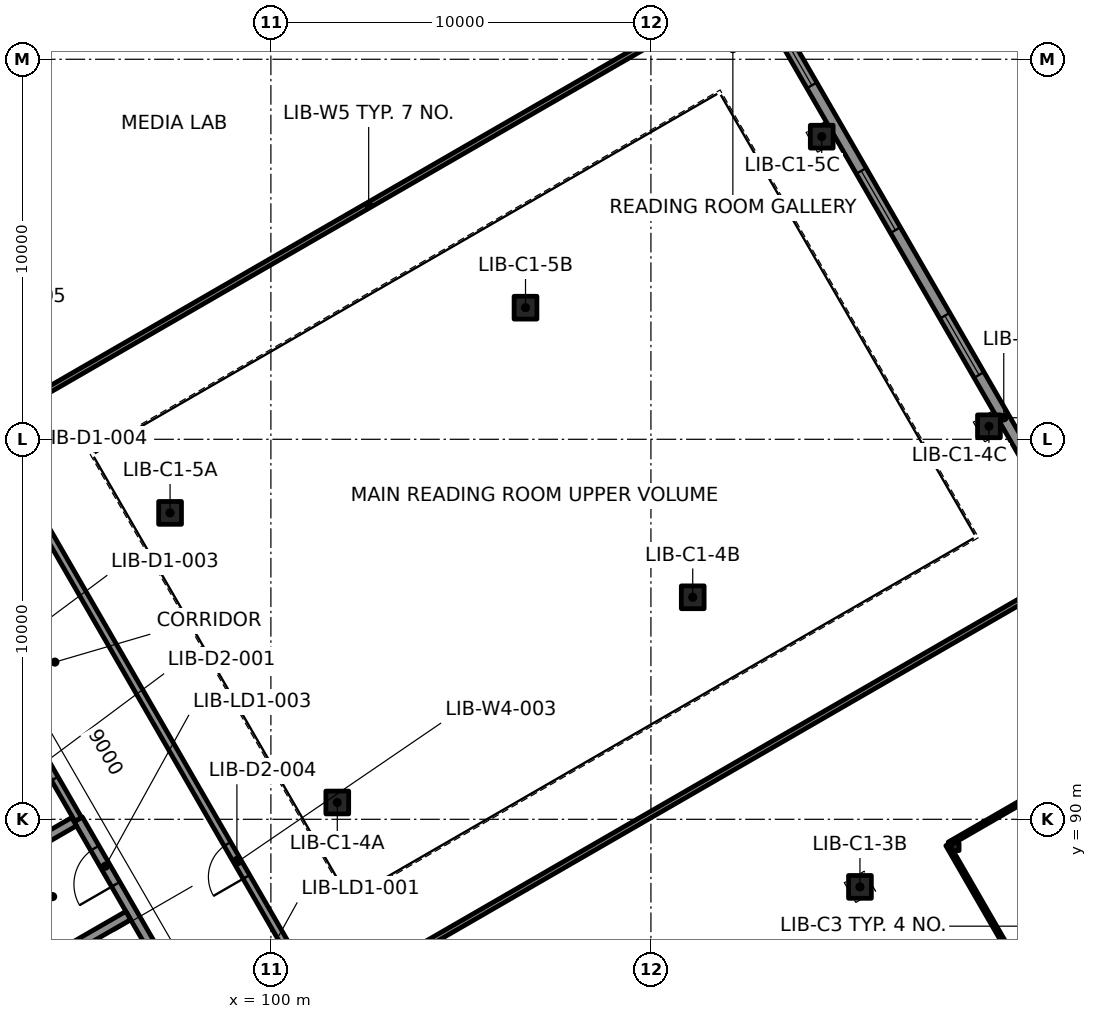
"""IFC4 building model, lengths in metres.
Left out: names, types, materials, properties, quantities, classifications, styles, units other than length and angle.
Written with IfcOpenShell. Run it as: python <this file> out.ifc"""

import sys

from ifc_helpers import new_model, si_unit, direction, frame, frame_2d, origin, origin_2d, place, context, subcontext, project, spatial, rectangle, extrude, element, fill, save


model = new_model("IFC4")
c1 = context("Model", 3, precision=1e-05, world=origin(), true_north=direction((0.0, 1.0)))
c2 = subcontext(c1, "Body", "Model", "MODEL_VIEW")
j1 = project(units=[si_unit("LENGTHUNIT", "METRE"), si_unit("PLANEANGLEUNIT", "RADIAN")], contexts=[c1])
p1 = place(None, origin())
s1 = spatial("IfcSite", under=j1, at=p1, CompositionType="ELEMENT")
p2 = place(p1, origin())
s2 = spatial("IfcBuilding", under=s1, at=p2, CompositionType="ELEMENT")
p3 = place(p2, frame((0.0, 0.0, 12.6)))
s3 = spatial("IfcBuildingStorey", under=s2, at=p3, CompositionType="ELEMENT", Elevation=12.6)
for number, where, z_axis, x_axis in (
    (1, (115.5, 88.221, -0.36), (0.0, 0.0, 1.0), (1.0, 0.0, 0.0)),
    (2, (101.747, 90.442, -0.36), (0.0, 0.0, 1.0), (1.0, 0.0, 0.0)),
    (3, (111.1, 95.842, -0.36), (0.0, 0.0, 1.0), (1.0, 0.0, 0.0)),
    (4, (118.894, 100.342, -0.36), (0.0, 0.0, 1.0), (1.0, 0.0, 0.0)),
    (5, (97.347, 98.063, -0.36), (0.0, 0.0, 1.0), (1.0, 0.0, 0.0)),
    (6, (106.7, 103.463, -0.36), (0.0, 0.0, 1.0), (1.0, 0.0, 0.0)),
    (7, (114.494, 107.963, -0.36), (0.0, 0.0, 1.0), (1.0, 0.0, 0.0)),
):
    element("IfcColumn", number, at=place(p3, frame(where, z_axis=z_axis, x_axis=x_axis)), inside=s3, PredefinedType="COLUMN", context=c2, shape_type="SweptSolid", body=[
        extrude(rectangle(XDim=0.6, YDim=0.6, at=origin_2d()), origin(), (0.0, 0.0, 1.0), 4.6),
    ])
p4 = place(p3, frame((118.008, 89.277, -2.3), z_axis=(0.0, 0.0, 1.0), x_axis=(1.0, 0.0, 0.0)))
e8 = element("IfcColumn", 8, at=p4, inside=s3, PredefinedType="COLUMN", context=c2, shape_type="SweptSolid", body=[
    extrude(rectangle(XDim=0.2, YDim=0.2, at=origin_2d()), origin(), (0.0, 0.0, 1.0), 4.4),
])
p5 = place(p3, frame((107.106, 62.36, 0.0), z_axis=(0.0, 0.0, 1.0), x_axis=(-0.49999992739, 0.866025445706, 0.0)))
e9 = element("IfcWall", 9, at=p5, inside=s3, PredefinedType="SOLIDWALL", context=c2, shape_type="SweptSolid", body=[
    extrude(rectangle(XDim=54.0, YDim=0.4, at=frame_2d((27.0, 0.0))), origin(), (0.0, 0.0, 1.0), 4.24),
])
p6 = place(p3, frame((132.784, 77.185, 0.0), z_axis=(0.0, 0.0, 1.0), x_axis=(-0.49999992739, 0.866025445706, 0.0)))
e10 = element("IfcWall", 10, at=p6, inside=s3, PredefinedType="SOLIDWALL", context=c2, shape_type="SweptSolid", body=[
    extrude(rectangle(XDim=54.0, YDim=0.3, at=frame_2d((27.0, 0.0))), origin(), (0.0, 0.0, 1.0), 4.24),
])
p7 = place(p6, frame((1.9, 0.0, 0.9)))
e11 = element("IfcOpeningElement", 11, at=p7, cuts=e10, PredefinedType="OPENING", context=c2, shape_type="SweptSolid", body=[
    extrude(rectangle(XDim=1.8, YDim=2.4, at=frame_2d((0.9, 1.2))), frame((0.0, 0.16, 0.0), z_axis=(0.0, -1.0, 0.0), x_axis=(1.0, 0.0, 0.0)), (0.0, 0.0, 1.0), 0.32),
])
p8 = place(p6, frame((6.3, 0.0, 0.9)))
e12 = element("IfcOpeningElement", 12, at=p8, cuts=e10, PredefinedType="OPENING", context=c2, shape_type="SweptSolid", body=[
    extrude(rectangle(XDim=1.8, YDim=2.4, at=frame_2d((0.9, 1.2))), frame((0.0, 0.16, 0.0), z_axis=(0.0, -1.0, 0.0), x_axis=(1.0, 0.0, 0.0)), (0.0, 0.0, 1.0), 0.32),
])
p9 = place(p6, frame((10.7, 0.0, 0.9)))
e13 = element("IfcOpeningElement", 13, at=p9, cuts=e10, PredefinedType="OPENING", context=c2, shape_type="SweptSolid", body=[
    extrude(rectangle(XDim=1.8, YDim=2.4, at=frame_2d((0.9, 1.2))), frame((0.0, 0.16, 0.0), z_axis=(0.0, -1.0, 0.0), x_axis=(1.0, 0.0, 0.0)), (0.0, 0.0, 1.0), 0.32),
])
p10 = place(p6, frame((15.1, 0.0, 0.9)))
e14 = element("IfcOpeningElement", 14, at=p10, cuts=e10, PredefinedType="OPENING", context=c2, shape_type="SweptSolid", body=[
    extrude(rectangle(XDim=1.8, YDim=2.4, at=frame_2d((0.9, 1.2))), frame((0.0, 0.16, 0.0), z_axis=(0.0, -1.0, 0.0), x_axis=(1.0, 0.0, 0.0)), (0.0, 0.0, 1.0), 0.32),
])
p11 = place(p6, frame((19.5, 0.0, 0.9)))
e15 = element("IfcOpeningElement", 15, at=p11, cuts=e10, PredefinedType="OPENING", context=c2, shape_type="SweptSolid", body=[
    extrude(rectangle(XDim=1.8, YDim=2.4, at=frame_2d((0.9, 1.2))), frame((0.0, 0.16, 0.0), z_axis=(0.0, -1.0, 0.0), x_axis=(1.0, 0.0, 0.0)), (0.0, 0.0, 1.0), 0.32),
])
p12 = place(p6, frame((23.9, 0.0, 0.9)))
e16 = element("IfcOpeningElement", 16, at=p12, cuts=e10, PredefinedType="OPENING", context=c2, shape_type="SweptSolid", body=[
    extrude(rectangle(XDim=1.8, YDim=2.4, at=frame_2d((0.9, 1.2))), frame((0.0, 0.16, 0.0), z_axis=(0.0, -1.0, 0.0), x_axis=(1.0, 0.0, 0.0)), (0.0, 0.0, 1.0), 0.32),
])
p13 = place(p6, frame((28.3, 0.0, 0.9)))
e17 = element("IfcOpeningElement", 17, at=p13, cuts=e10, PredefinedType="OPENING", context=c2, shape_type="SweptSolid", body=[
    extrude(rectangle(XDim=1.8, YDim=2.4, at=frame_2d((0.9, 1.2))), frame((0.0, 0.16, 0.0), z_axis=(0.0, -1.0, 0.0), x_axis=(1.0, 0.0, 0.0)), (0.0, 0.0, 1.0), 0.32),
])
p14 = place(p6, frame((32.7, 0.0, 0.9)))
e18 = element("IfcOpeningElement", 18, at=p14, cuts=e10, PredefinedType="OPENING", context=c2, shape_type="SweptSolid", body=[
    extrude(rectangle(XDim=1.8, YDim=2.4, at=frame_2d((0.9, 1.2))), frame((0.0, 0.16, 0.0), z_axis=(0.0, -1.0, 0.0), x_axis=(1.0, 0.0, 0.0)), (0.0, 0.0, 1.0), 0.32),
])
p15 = place(p6, frame((37.1, 0.0, 0.9)))
e19 = element("IfcOpeningElement", 19, at=p15, cuts=e10, PredefinedType="OPENING", context=c2, shape_type="SweptSolid", body=[
    extrude(rectangle(XDim=1.8, YDim=2.4, at=frame_2d((0.9, 1.2))), frame((0.0, 0.16, 0.0), z_axis=(0.0, -1.0, 0.0), x_axis=(1.0, 0.0, 0.0)), (0.0, 0.0, 1.0), 0.32),
])
p16 = place(p6, frame((50.3, 0.0, 0.9)))
e20 = element("IfcOpeningElement", 20, at=p16, cuts=e10, PredefinedType="OPENING", context=c2, shape_type="SweptSolid", body=[
    extrude(rectangle(XDim=1.8, YDim=2.4, at=frame_2d((0.9, 1.2))), frame((0.0, 0.16, 0.0), z_axis=(0.0, -1.0, 0.0), x_axis=(1.0, 0.0, 0.0)), (0.0, 0.0, 1.0), 0.32),
])
p17 = place(p3, frame((80.354, 109.095, 0.0), z_axis=(0.0, 0.0, 1.0), x_axis=(0.866026568746, 0.499997982221, 0.0)))
e21 = element("IfcWall", 21, at=p17, inside=s3, PredefinedType="SOLIDWALL", context=c2, shape_type="SweptSolid", body=[
    extrude(rectangle(XDim=29.3, YDim=0.3, at=frame_2d((14.65, 0.0))), origin(), (0.0, 0.0, 1.0), 4.24),
])
p18 = place(p3, frame((99.205, 82.595, 0.0), z_axis=(0.0, 0.0, 1.0), x_axis=(-0.500011643316, 0.866018681408, 0.0)))
e22 = element("IfcWall", 22, at=p18, inside=s3, PredefinedType="SOLIDWALL", context=c2, shape_type="SweptSolid", body=[
    extrude(rectangle(XDim=8.55, YDim=0.25, at=frame_2d((4.275, 0.0))), origin(), (0.0, 0.0, 1.0), 4.24),
])
p19 = place(p18, frame((0.875, 0.0, 0.0)))
e23 = element("IfcOpeningElement", 23, at=p19, cuts=e22, PredefinedType="OPENING", context=c2, shape_type="SweptSolid", body=[
    extrude(rectangle(XDim=1.1, YDim=2.1, at=frame_2d((0.55, 1.05))), frame((0.0, 0.135, 0.0), z_axis=(0.0, -1.0, 0.0), x_axis=(1.0, 0.0, 0.0)), (0.0, 0.0, 1.0), 0.27),
])
p20 = place(p18, frame((3.725, 0.0, 0.0)))
e24 = element("IfcOpeningElement", 24, at=p20, cuts=e22, PredefinedType="OPENING", context=c2, shape_type="SweptSolid", body=[
    extrude(rectangle(XDim=1.1, YDim=2.1, at=frame_2d((0.55, 1.05))), frame((0.0, 0.135, 0.0), z_axis=(0.0, -1.0, 0.0), x_axis=(1.0, 0.0, 0.0)), (0.0, 0.0, 1.0), 0.27),
])
p21 = place(p18, frame((6.575, 0.0, 0.0)))
e25 = element("IfcOpeningElement", 25, at=p21, cuts=e22, PredefinedType="OPENING", context=c2, shape_type="SweptSolid", body=[
    extrude(rectangle(XDim=1.1, YDim=2.1, at=frame_2d((0.55, 1.05))), frame((0.0, 0.135, 0.0), z_axis=(0.0, -1.0, 0.0), x_axis=(1.0, 0.0, 0.0)), (0.0, 0.0, 1.0), 0.27),
])
p22 = place(p3, frame((94.93, 90.0, 0.0), z_axis=(0.0, 0.0, 1.0), x_axis=(-0.499997667785, 0.866026750285, 0.0)))
e26 = element("IfcWall", 26, at=p22, inside=s3, PredefinedType="PARTITIONING", context=c2, shape_type="SweptSolid", body=[
    extrude(rectangle(XDim=14.59, YDim=0.2, at=frame_2d((7.295, 0.0))), origin(), (0.0, 0.0, 1.0), 4.24),
])
p23 = place(p22, frame((1.235, 0.0, 0.0)))
e27 = element("IfcOpeningElement", 27, at=p23, cuts=e26, PredefinedType="OPENING", context=c2, shape_type="SweptSolid", body=[
    extrude(rectangle(XDim=1.0, YDim=2.1, at=frame_2d((0.5, 1.05))), frame((0.0, 0.11, 0.0), z_axis=(0.0, -1.0, 0.0), x_axis=(1.0, 0.0, 0.0)), (0.0, 0.0, 1.0), 0.22),
])
p24 = place(p22, frame((4.275, 0.0, 0.0)))
e28 = element("IfcOpeningElement", 28, at=p24, cuts=e26, PredefinedType="OPENING", context=c2, shape_type="SweptSolid", body=[
    extrude(rectangle(XDim=0.9, YDim=2.1, at=frame_2d((0.45, 1.05))), frame((0.0, 0.11, 0.0), z_axis=(0.0, -1.0, 0.0), x_axis=(1.0, 0.0, 0.0)), (0.0, 0.0, 1.0), 0.22),
])
p25 = place(p22, frame((8.025, 0.0, 0.0)))
e29 = element("IfcOpeningElement", 29, at=p25, cuts=e26, PredefinedType="OPENING", context=c2, shape_type="SweptSolid", body=[
    extrude(rectangle(XDim=0.9, YDim=2.1, at=frame_2d((0.45, 1.05))), frame((0.0, 0.11, 0.0), z_axis=(0.0, -1.0, 0.0), x_axis=(1.0, 0.0, 0.0)), (0.0, 0.0, 1.0), 0.22),
])
p26 = place(p22, frame((12.325, 0.0, 0.0)))
e30 = element("IfcOpeningElement", 30, at=p26, cuts=e26, PredefinedType="OPENING", context=c2, shape_type="SweptSolid", body=[
    extrude(rectangle(XDim=0.9, YDim=2.1, at=frame_2d((0.45, 1.05))), frame((0.0, 0.11, 0.0), z_axis=(0.0, -1.0, 0.0), x_axis=(1.0, 0.0, 0.0)), (0.0, 0.0, 1.0), 0.22),
])
p27 = place(p3, frame((93.692, 85.994, 0.0), z_axis=(0.0, 0.0, 1.0), x_axis=(0.866003658127, 0.500037662692, 0.0)))
e31 = element("IfcWall", 31, at=p27, inside=s3, PredefinedType="SOLIDWALL", context=c2, shape_type="SweptSolid", body=[
    extrude(rectangle(XDim=2.95, YDim=0.25, at=frame_2d((1.475, 0.0))), origin(), (0.0, 0.0, 1.0), 4.24),
])
p28 = place(p3, frame((92.267, 88.462, 0.0), z_axis=(0.0, 0.0, 1.0), x_axis=(0.866024349092, 0.500001826776, 0.0)))
e32 = element("IfcWall", 32, at=p28, inside=s3, PredefinedType="SOLIDWALL", context=c2, shape_type="SweptSolid", body=[
    extrude(rectangle(XDim=2.95, YDim=0.25, at=frame_2d((1.475, 0.0))), origin(), (0.0, 0.0, 1.0), 4.24),
])
p29 = place(p3, frame((112.496, 65.725, 0.0), z_axis=(0.0, 0.0, 1.0), x_axis=(-0.499998673217, 0.866026169802, 0.0)))
e33 = element("IfcWall", 33, at=p29, inside=s3, PredefinedType="PARTITIONING", context=c2, shape_type="SweptSolid", body=[
    extrude(rectangle(XDim=53.48, YDim=0.2, at=frame_2d((26.74, 0.0))), origin(), (0.0, 0.0, 1.0), 4.24),
])
p30 = place(p29, frame((13.08, 0.0, 0.0)))
e34 = element("IfcOpeningElement", 34, at=p30, cuts=e33, PredefinedType="OPENING", context=c2, shape_type="SweptSolid", body=[
    extrude(rectangle(XDim=1.0, YDim=2.1, at=frame_2d((0.5, 1.05))), frame((0.0, 0.11, 0.0), z_axis=(0.0, -1.0, 0.0), x_axis=(1.0, 0.0, 0.0)), (0.0, 0.0, 1.0), 0.22),
])
p31 = place(p29, frame((26.28, 0.0, 0.0)))
e35 = element("IfcOpeningElement", 35, at=p31, cuts=e33, PredefinedType="OPENING", context=c2, shape_type="SweptSolid", body=[
    extrude(rectangle(XDim=1.0, YDim=2.1, at=frame_2d((0.5, 1.05))), frame((0.0, 0.11, 0.0), z_axis=(0.0, -1.0, 0.0), x_axis=(1.0, 0.0, 0.0)), (0.0, 0.0, 1.0), 0.22),
])
p32 = place(p29, frame((43.88, 0.0, 0.0)))
e36 = element("IfcOpeningElement", 36, at=p32, cuts=e33, PredefinedType="OPENING", context=c2, shape_type="SweptSolid", body=[
    extrude(rectangle(XDim=1.0, YDim=2.1, at=frame_2d((0.5, 1.05))), frame((0.0, 0.11, 0.0), z_axis=(0.0, -1.0, 0.0), x_axis=(1.0, 0.0, 0.0)), (0.0, 0.0, 1.0), 0.22),
])
p33 = place(p29, frame((50.58, 0.0, 0.0)))
e37 = element("IfcOpeningElement", 37, at=p33, cuts=e33, PredefinedType="OPENING", context=c2, shape_type="SweptSolid", body=[
    extrude(rectangle(XDim=1.0, YDim=2.1, at=frame_2d((0.5, 1.05))), frame((0.0, 0.11, 0.0), z_axis=(0.0, -1.0, 0.0), x_axis=(1.0, 0.0, 0.0)), (0.0, 0.0, 1.0), 0.22),
])
p34 = place(p3, frame((101.392, 85.157, 0.0), z_axis=(0.0, 0.0, 1.0), x_axis=(0.866022961126, 0.500004230785, 0.0)))
e38 = element("IfcWall", 38, at=p34, inside=s3, PredefinedType="PARTITIONING", context=c2, shape_type="SweptSolid", body=[
    extrude(rectangle(XDim=23.05, YDim=0.15, at=frame_2d((11.525, 0.0))), origin(), (0.0, 0.0, 1.0), 4.24),
])
p35 = place(p3, frame((122.333, 81.486, 0.0), z_axis=(0.0, 0.0, 1.0), x_axis=(-0.500002365587, 0.866024038008, 0.0)))
e39 = element("IfcWall", 39, at=p35, inside=s3, PredefinedType="PARTITIONING", context=c2, shape_type="SweptSolid", body=[
    extrude(rectangle(XDim=9.06, YDim=0.1, at=frame_2d((4.53, 0.0))), origin(), (0.0, 0.0, 1.0), 4.24),
])
p36 = place(p3, frame((117.847, 89.357, 0.0), z_axis=(0.0, 0.0, 1.0), x_axis=(0.866003658127, 0.500037662692, 0.0)))
e40 = element("IfcWall", 40, at=p36, inside=s3, PredefinedType="PARTITIONING", context=c2, shape_type="SweptSolid", body=[
    extrude(rectangle(XDim=2.95, YDim=0.1, at=frame_2d((1.475, 0.0))), origin(), (0.0, 0.0, 1.0), 4.24),
])
for number, where, z_axis, x_axis in (
    (41, (92.592, 100.399, 0.0), (0.0, 0.0, 1.0), (0.866, 0.5, 0.0)),
    (42, (88.192, 108.02, 0.0), (0.0, 0.0, 1.0), (0.866, 0.5, 0.0)),
):
    element("IfcWall", number, at=place(p3, frame(where, z_axis=z_axis, x_axis=x_axis)), inside=s3, PredefinedType="PARTITIONING", context=c2, shape_type="SweptSolid", body=[
        extrude(rectangle(XDim=23.05, YDim=0.15, at=frame_2d((11.525, 0.0))), origin(), (0.0, 0.0, 1.0), 4.24),
    ])
p37 = place(p13, origin())
e43 = element("IfcWindow", 43, at=p37, inside=s3, PartitioningType="SINGLE_PANEL", PredefinedType="WINDOW", context=c2, shape_type="SweptSolid", body=[
    extrude(rectangle(XDim=1.8, YDim=2.4, at=frame_2d((0.9, 1.2))), frame((0.0, 0.03, 0.0), z_axis=(0.0, -1.0, 0.0), x_axis=(1.0, 0.0, 0.0)), (0.0, 0.0, 1.0), 0.06),
])
fill(e17, e43)
p38 = place(p14, origin())
e44 = element("IfcWindow", 44, at=p38, inside=s3, PartitioningType="SINGLE_PANEL", PredefinedType="WINDOW", context=c2, shape_type="SweptSolid", body=[
    extrude(rectangle(XDim=1.8, YDim=2.4, at=frame_2d((0.9, 1.2))), frame((0.0, 0.03, 0.0), z_axis=(0.0, -1.0, 0.0), x_axis=(1.0, 0.0, 0.0)), (0.0, 0.0, 1.0), 0.06),
])
fill(e18, e44)
p39 = place(p15, origin())
e45 = element("IfcWindow", 45, at=p39, inside=s3, PartitioningType="SINGLE_PANEL", PredefinedType="WINDOW", context=c2, shape_type="SweptSolid", body=[
    extrude(rectangle(XDim=1.8, YDim=2.4, at=frame_2d((0.9, 1.2))), frame((0.0, 0.03, 0.0), z_axis=(0.0, -1.0, 0.0), x_axis=(1.0, 0.0, 0.0)), (0.0, 0.0, 1.0), 0.06),
])
fill(e19, e45)
p40 = place(p23, origin())
e46 = element("IfcDoor", 46, at=p40, inside=s3, OperationType="SINGLE_SWING_LEFT", PredefinedType="DOOR", context=c2, shape_type="SweptSolid", body=[
    extrude(rectangle(XDim=1.0, YDim=2.1, at=frame_2d((0.5, 1.05))), frame((0.0, 0.025, 0.0), z_axis=(0.0, -1.0, 0.0), x_axis=(1.0, 0.0, 0.0)), (0.0, 0.0, 1.0), 0.05),
])
fill(e27, e46)
p41 = place(p21, origin())
e47 = element("IfcDoor", 47, at=p41, inside=s3, OperationType="DOUBLE_DOOR_SLIDING", PredefinedType="DOOR", context=c2, shape_type="SweptSolid", body=[
    extrude(rectangle(XDim=1.1, YDim=2.1, at=frame_2d((0.55, 1.05))), frame((0.0, 0.025, 0.0), z_axis=(0.0, -1.0, 0.0), x_axis=(1.0, 0.0, 0.0)), (0.0, 0.0, 1.0), 0.05),
])
fill(e25, e47)
p42 = place(p31, origin())
e48 = element("IfcDoor", 48, at=p42, inside=s3, OperationType="SINGLE_SWING_RIGHT", PredefinedType="DOOR", context=c2, shape_type="SweptSolid", body=[
    extrude(rectangle(XDim=1.0, YDim=2.1, at=frame_2d((0.5, 1.05))), frame((0.0, 0.025, 0.0), z_axis=(0.0, -1.0, 0.0), x_axis=(1.0, 0.0, 0.0)), (0.0, 0.0, 1.0), 0.05),
])
fill(e35, e48)
save(model, sys.argv[1])
